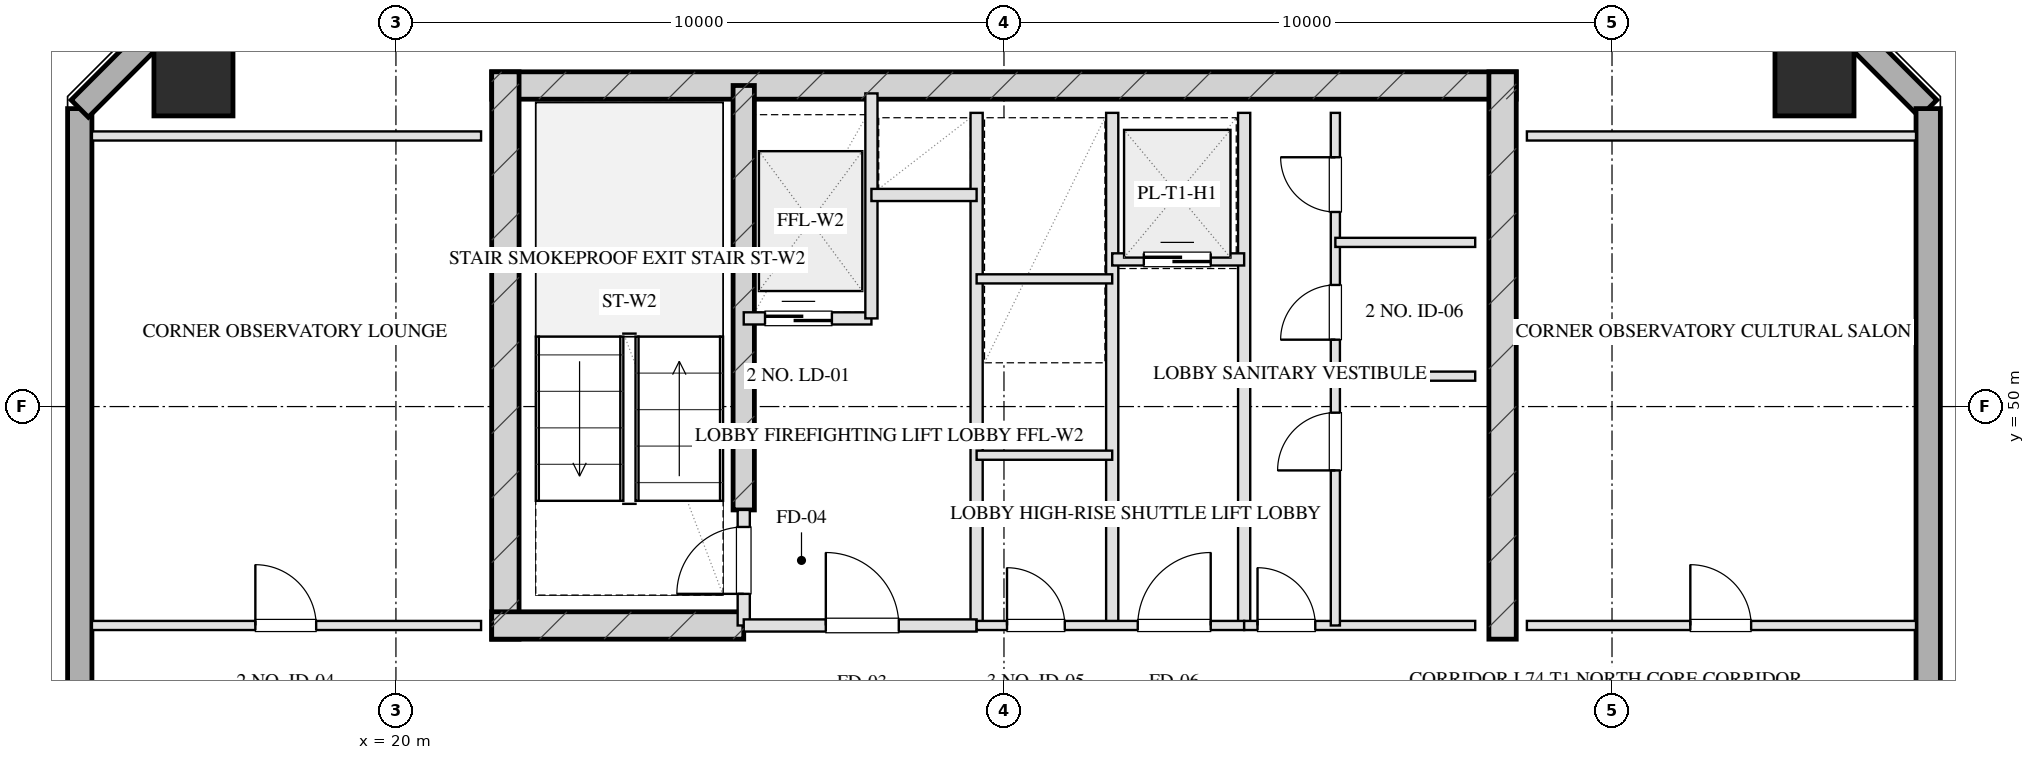
"""IFC4 building model, lengths in metres.
Left out: names, types, materials, properties, quantities, classifications, styles, units other than length and angle.
Written with IfcOpenShell. Run it as: python <this file> out.ifc"""

import sys

from ifc_helpers import new_model, si_unit, direction, frame, frame_2d, origin, origin_2d, place, context, subcontext, project, spatial, rectangle, hollow_rectangle, extrude, element, fill, save


model = new_model("IFC4")
c1 = context("Model", 3, precision=1e-05, world=origin(), true_north=direction((0.0, 1.0)))
c2 = subcontext(c1, "Body", "Model", "MODEL_VIEW")
j1 = project(units=[si_unit("LENGTHUNIT", "METRE"), si_unit("PLANEANGLEUNIT", "RADIAN")], contexts=[c1])
p1 = place(None, origin())
s1 = spatial("IfcSite", under=j1, at=p1, CompositionType="ELEMENT")
p2 = place(p1, origin())
s2 = spatial("IfcBuilding", under=s1, at=p2, CompositionType="ELEMENT")
p3 = place(p2, frame((0.0, 0.0, 269.6)))
s3 = spatial("IfcBuildingStorey", under=s2, at=p3, CompositionType="ELEMENT", Elevation=269.6)
p4 = place(p3, frame((21.575, 55.28, 0.0), z_axis=(0.0, 0.0, 1.0), x_axis=(1.0, 0.0, 0.0)))
e1 = element("IfcWall", 1, at=p4, inside=s3, PredefinedType="SHEAR", context=c2, shape_type="SweptSolid", body=[
    extrude(rectangle(XDim=16.85, YDim=0.45, at=frame_2d((8.425, 0.0))), origin(), (0.0, 0.0, 1.0), 3.2),
])
for number, where, z_axis, x_axis in (
    (2, (21.8, 46.175, 0.0), (0.0, 0.0, 1.0), (0.0, 1.0, 0.0)),
    (3, (38.2, 46.175, 0.0), (0.0, 0.0, 1.0), (0.0, 1.0, 0.0)),
):
    element("IfcWall", number, at=place(p3, frame(where, z_axis=z_axis, x_axis=x_axis)), inside=s3, PredefinedType="SHEAR", context=c2, shape_type="SweptSolid", body=[
        extrude(rectangle(XDim=9.33, YDim=0.45, at=frame_2d((4.665, 0.0))), origin(), (0.0, 0.0, 1.0), 3.2),
    ])
p5 = place(p3, frame((25.72, 48.3, 0.0), z_axis=(0.0, 0.0, 1.0), x_axis=(0.0, 1.0, 0.0)))
e4 = element("IfcWall", 4, at=p5, inside=s3, PredefinedType="SHEAR", context=c2, shape_type="SweptSolid", body=[
    extrude(rectangle(XDim=6.98, YDim=0.35, at=frame_2d((3.49, 0.0))), origin(), (0.0, 0.0, 1.0), 3.2),
])
p6 = place(p3, frame((21.575, 46.4, 0.0), z_axis=(0.0, 0.0, 1.0), x_axis=(1.0, 0.0, 0.0)))
e5 = element("IfcWall", 5, at=p6, inside=s3, PredefinedType="SHEAR", context=c2, shape_type="SweptSolid", body=[
    extrude(rectangle(XDim=4.145, YDim=0.45, at=frame_2d((2.073, 0.0))), origin(), (0.0, 0.0, 1.0), 3.2),
])
for number, where, z_axis, x_axis in (
    (6, (43.33, 55.43, 0.0), (0.0, 0.0, 1.0), (1.0, 0.0, 0.0)),
    (7, (16.67, 55.43, 0.0), (0.0, 0.0, 1.0), (1.0, 0.0, 0.0)),
):
    element("IfcColumn", number, at=place(p3, frame(where, z_axis=z_axis, x_axis=x_axis)), inside=s3, PredefinedType="COLUMN", context=c2, shape_type="SweptSolid", body=[
        extrude(hollow_rectangle(XDim=1.3, YDim=1.3, WallThickness=0.045, at=origin_2d()), origin(), (0.0, 0.0, 1.0), 3.201),
    ])
p7 = place(p3, frame((14.8, 13.1, 0.0), z_axis=(0.0, 0.0, 1.0), x_axis=(0.0, 1.0, 0.0)))
e8 = element("IfcWall", 8, at=p7, inside=s3, PredefinedType="SOLIDWALL", context=c2, shape_type="SweptSolid", body=[
    extrude(rectangle(XDim=41.8, YDim=0.4, at=frame_2d((20.9, 0.0))), origin(), (0.0, 0.0, 1.0), 2.36),
])
p8 = place(p7, frame((22.525, 0.0, 0.75)))
e9 = element("IfcOpeningElement", 9, at=p8, cuts=e8, PredefinedType="OPENING", context=c2, shape_type="SweptSolid", body=[
    extrude(rectangle(XDim=1.95, YDim=1.21, at=frame_2d((0.975, 0.605))), frame((0.0, 0.21, 0.0), z_axis=(0.0, -1.0, 0.0), x_axis=(1.0, 0.0, 0.0)), (0.0, 0.0, 1.0), 0.42),
])
p9 = place(p7, frame((26.325, 0.0, 0.75)))
e10 = element("IfcOpeningElement", 10, at=p9, cuts=e8, PredefinedType="OPENING", context=c2, shape_type="SweptSolid", body=[
    extrude(rectangle(XDim=1.95, YDim=1.21, at=frame_2d((0.975, 0.605))), frame((0.0, 0.21, 0.0), z_axis=(0.0, -1.0, 0.0), x_axis=(1.0, 0.0, 0.0)), (0.0, 0.0, 1.0), 0.42),
])
p10 = place(p7, frame((14.55, 0.0, 0.0)))
e11 = element("IfcOpeningElement", 11, at=p10, cuts=e8, PredefinedType="OPENING", context=c2, shape_type="SweptSolid", body=[
    extrude(rectangle(XDim=1.1, YDim=2.15, at=frame_2d((0.55, 1.075))), frame((0.0, 0.21, 0.0), z_axis=(0.0, -1.0, 0.0), x_axis=(1.0, 0.0, 0.0)), (0.0, 0.0, 1.0), 0.42),
])
for number, where, z_axis, x_axis in (
    (12, (14.8, 54.9, 0.0), (0.0, 0.0, 1.0), (0.707, 0.707, 0.0)),
    (13, (42.8, 57.3, 0.0), (0.0, 0.0, 1.0), (0.707, -0.707, 0.0)),
):
    element("IfcWall", number, at=place(p3, frame(where, z_axis=z_axis, x_axis=x_axis)), inside=s3, PredefinedType="SOLIDWALL", context=c2, shape_type="SweptSolid", body=[
        extrude(rectangle(XDim=3.394, YDim=0.4, at=frame_2d((1.697, 0.0))), origin(), (0.0, 0.0, 1.0), 2.36),
    ])
p11 = place(p3, frame((45.2, 54.9, 0.0), z_axis=(0.0, 0.0, 1.0), x_axis=(0.0, -1.0, 0.0)))
e14 = element("IfcWall", 14, at=p11, inside=s3, PredefinedType="SOLIDWALL", context=c2, shape_type="SweptSolid", body=[
    extrude(rectangle(XDim=41.8, YDim=0.4, at=frame_2d((20.9, 0.0))), origin(), (0.0, 0.0, 1.0), 2.36),
])
p12 = place(p11, frame((17.325, 0.0, 0.75)))
e15 = element("IfcOpeningElement", 15, at=p12, cuts=e14, PredefinedType="OPENING", context=c2, shape_type="SweptSolid", body=[
    extrude(rectangle(XDim=1.95, YDim=1.21, at=frame_2d((0.975, 0.605))), frame((0.0, 0.21, 0.0), z_axis=(0.0, -1.0, 0.0), x_axis=(1.0, 0.0, 0.0)), (0.0, 0.0, 1.0), 0.42),
])
p13 = place(p11, frame((13.525, 0.0, 0.75)))
e16 = element("IfcOpeningElement", 16, at=p13, cuts=e14, PredefinedType="OPENING", context=c2, shape_type="SweptSolid", body=[
    extrude(rectangle(XDim=1.95, YDim=1.21, at=frame_2d((0.975, 0.605))), frame((0.0, 0.21, 0.0), z_axis=(0.0, -1.0, 0.0), x_axis=(1.0, 0.0, 0.0)), (0.0, 0.0, 1.0), 0.42),
])
p14 = place(p11, frame((23.45, 0.0, 0.0)))
e17 = element("IfcOpeningElement", 17, at=p14, cuts=e14, PredefinedType="OPENING", context=c2, shape_type="SweptSolid", body=[
    extrude(rectangle(XDim=1.1, YDim=2.15, at=frame_2d((0.55, 1.075))), frame((0.0, 0.21, 0.0), z_axis=(0.0, -1.0, 0.0), x_axis=(1.0, 0.0, 0.0)), (0.0, 0.0, 1.0), 0.42),
])
p15 = place(p3, frame((25.72, 46.4, 0.0), z_axis=(0.0, 0.0, 1.0), x_axis=(0.0, 1.0, 0.0)))
e18 = element("IfcWall", 18, at=p15, inside=s3, PredefinedType="PARTITIONING", context=c2, shape_type="SweptSolid", body=[
    extrude(rectangle(XDim=1.9, YDim=0.2, at=frame_2d((0.95, 0.0))), origin(), (0.0, 0.0, 1.0), 2.925),
])
p16 = place(p15, frame((0.52, 0.0, 0.0)))
e19 = element("IfcOpeningElement", 19, at=p16, cuts=e18, PredefinedType="OPENING", context=c2, shape_type="SweptSolid", body=[
    extrude(rectangle(XDim=1.1, YDim=2.05, at=frame_2d((0.55, 1.025))), frame((0.0, 0.11, 0.0), z_axis=(0.0, -1.0, 0.0), x_axis=(1.0, 0.0, 0.0)), (0.0, 0.0, 1.0), 0.22),
])
p17 = place(p3, frame((29.55, 46.4, 0.0), z_axis=(0.0, 0.0, 1.0), x_axis=(0.0, 1.0, 0.0)))
e20 = element("IfcWall", 20, at=p17, inside=s3, PredefinedType="PARTITIONING", context=c2, shape_type="SweptSolid", body=[
    extrude(rectangle(XDim=8.43, YDim=0.2, at=frame_2d((4.215, 0.0))), origin(), (0.0, 0.0, 1.0), 2.925),
])
p18 = place(p3, frame((25.72, 46.4, 0.0), z_axis=(0.0, 0.0, 1.0), x_axis=(1.0, 0.0, 0.0)))
e21 = element("IfcWall", 21, at=p18, inside=s3, PredefinedType="PARTITIONING", context=c2, shape_type="SweptSolid", body=[
    extrude(rectangle(XDim=3.83, YDim=0.2, at=frame_2d((1.915, 0.0))), origin(), (0.0, 0.0, 1.0), 2.925),
])
p19 = place(p18, frame((1.35, 0.0, 0.0)))
e22 = element("IfcOpeningElement", 22, at=p19, cuts=e21, PredefinedType="OPENING", context=c2, shape_type="SweptSolid", body=[
    extrude(rectangle(XDim=1.2, YDim=2.05, at=frame_2d((0.6, 1.025))), frame((0.0, 0.11, 0.0), z_axis=(0.0, -1.0, 0.0), x_axis=(1.0, 0.0, 0.0)), (0.0, 0.0, 1.0), 0.22),
])
p20 = place(p3, frame((25.72, 51.45, 0.0), z_axis=(0.0, 0.0, 1.0), x_axis=(1.0, 0.0, 0.0)))
e23 = element("IfcWall", 23, at=p20, inside=s3, PredefinedType="PARTITIONING", context=c2, shape_type="SweptSolid", body=[
    extrude(rectangle(XDim=2.1, YDim=0.2, at=frame_2d((1.05, 0.0))), origin(), (0.0, 0.0, 1.0), 2.925),
])
p21 = place(p20, frame((0.35, 0.0, 0.0)))
e24 = element("IfcOpeningElement", 24, at=p21, cuts=e23, PredefinedType="OPENING", context=c2, shape_type="SweptSolid", body=[
    extrude(rectangle(XDim=1.1, YDim=2.05, at=frame_2d((0.55, 1.025))), frame((0.0, 0.11, 0.0), z_axis=(0.0, -1.0, 0.0), x_axis=(1.0, 0.0, 0.0)), (0.0, 0.0, 1.0), 0.22),
])
p22 = place(p3, frame((27.82, 51.45, 0.0), z_axis=(0.0, 0.0, 1.0), x_axis=(0.0, 1.0, 0.0)))
e25 = element("IfcWall", 25, at=p22, inside=s3, PredefinedType="PARTITIONING", context=c2, shape_type="SweptSolid", body=[
    extrude(rectangle(XDim=3.7, YDim=0.2, at=frame_2d((1.85, 0.0))), origin(), (0.0, 0.0, 1.0), 2.925),
])
p23 = place(p3, frame((27.82, 53.48, 0.0), z_axis=(0.0, 0.0, 1.0), x_axis=(1.0, 0.0, 0.0)))
e26 = element("IfcWall", 26, at=p23, inside=s3, PredefinedType="PARTITIONING", context=c2, shape_type="SweptSolid", body=[
    extrude(rectangle(XDim=1.73, YDim=0.2, at=frame_2d((0.865, 0.0))), origin(), (0.0, 0.0, 1.0), 2.925),
])
for number, where, z_axis, x_axis in (
    (27, (33.95, 46.4, 0.0), (0.0, 0.0, 1.0), (0.0, 1.0, 0.0)),
    (28, (31.78, 46.4, 0.0), (0.0, 0.0, 1.0), (0.0, 1.0, 0.0)),
):
    element("IfcWall", number, at=place(p3, frame(where, z_axis=z_axis, x_axis=x_axis)), inside=s3, PredefinedType="PARTITIONING", context=c2, shape_type="SweptSolid", body=[
        extrude(rectangle(XDim=8.43, YDim=0.2, at=frame_2d((4.215, 0.0))), origin(), (0.0, 0.0, 1.0), 2.925),
    ])
p24 = place(p3, frame((29.55, 46.4, 0.0), z_axis=(0.0, 0.0, 1.0), x_axis=(1.0, 0.0, 0.0)))
e29 = element("IfcWall", 29, at=p24, inside=s3, PredefinedType="PARTITIONING", context=c2, shape_type="SweptSolid", body=[
    extrude(rectangle(XDim=4.4, YDim=0.15, at=frame_2d((2.2, 0.0))), origin(), (0.0, 0.0, 1.0), 2.925),
])
p25 = place(p24, frame((0.5, 0.0, 0.0)))
e30 = element("IfcOpeningElement", 30, at=p25, cuts=e29, PredefinedType="OPENING", context=c2, shape_type="SweptSolid", body=[
    extrude(rectangle(XDim=0.95, YDim=2.05, at=frame_2d((0.475, 1.025))), frame((0.0, 0.085, 0.0), z_axis=(0.0, -1.0, 0.0), x_axis=(1.0, 0.0, 0.0)), (0.0, 0.0, 1.0), 0.17),
])
p26 = place(p24, frame((2.65, 0.0, 0.0)))
e31 = element("IfcOpeningElement", 31, at=p26, cuts=e29, PredefinedType="OPENING", context=c2, shape_type="SweptSolid", body=[
    extrude(rectangle(XDim=1.2, YDim=2.05, at=frame_2d((0.6, 1.025))), frame((0.0, 0.085, 0.0), z_axis=(0.0, -1.0, 0.0), x_axis=(1.0, 0.0, 0.0)), (0.0, 0.0, 1.0), 0.17),
])
for number, where, z_axis, x_axis in (
    (32, (29.55, 49.2, 0.0), (0.0, 0.0, 1.0), (1.0, 0.0, 0.0)),
    (33, (29.55, 52.1, 0.0), (0.0, 0.0, 1.0), (1.0, 0.0, 0.0)),
):
    element("IfcWall", number, at=place(p3, frame(where, z_axis=z_axis, x_axis=x_axis)), inside=s3, PredefinedType="PARTITIONING", context=c2, shape_type="SweptSolid", body=[
        extrude(rectangle(XDim=2.23, YDim=0.15, at=frame_2d((1.115, 0.0))), origin(), (0.0, 0.0, 1.0), 2.925),
    ])
p27 = place(p3, frame((31.78, 52.42, 0.0), z_axis=(0.0, 0.0, 1.0), x_axis=(1.0, 0.0, 0.0)))
e34 = element("IfcWall", 34, at=p27, inside=s3, PredefinedType="PARTITIONING", context=c2, shape_type="SweptSolid", body=[
    extrude(rectangle(XDim=2.17, YDim=0.2, at=frame_2d((1.085, 0.0))), origin(), (0.0, 0.0, 1.0), 2.925),
])
p28 = place(p27, frame((0.52, 0.0, 0.0)))
e35 = element("IfcOpeningElement", 35, at=p28, cuts=e34, PredefinedType="OPENING", context=c2, shape_type="SweptSolid", body=[
    extrude(rectangle(XDim=1.1, YDim=2.05, at=frame_2d((0.55, 1.025))), frame((0.0, 0.11, 0.0), z_axis=(0.0, -1.0, 0.0), x_axis=(1.0, 0.0, 0.0)), (0.0, 0.0, 1.0), 0.22),
])
p29 = place(p3, frame((33.95, 46.4, 0.0), z_axis=(0.0, 0.0, 1.0), x_axis=(1.0, 0.0, 0.0)))
e36 = element("IfcWall", 36, at=p29, inside=s3, PredefinedType="PARTITIONING", context=c2, shape_type="SweptSolid", body=[
    extrude(rectangle(XDim=3.8, YDim=0.15, at=frame_2d((1.9, 0.0))), origin(), (0.0, 0.0, 1.0), 2.925),
])
p30 = place(p29, frame((0.22, 0.0, 0.0)))
e37 = element("IfcOpeningElement", 37, at=p30, cuts=e36, PredefinedType="OPENING", context=c2, shape_type="SweptSolid", body=[
    extrude(rectangle(XDim=0.95, YDim=2.05, at=frame_2d((0.475, 1.025))), frame((0.0, 0.085, 0.0), z_axis=(0.0, -1.0, 0.0), x_axis=(1.0, 0.0, 0.0)), (0.0, 0.0, 1.0), 0.17),
])
p31 = place(p3, frame((35.45, 46.4, 0.0), z_axis=(0.0, 0.0, 1.0), x_axis=(0.0, 1.0, 0.0)))
e38 = element("IfcWall", 38, at=p31, inside=s3, PredefinedType="PARTITIONING", context=c2, shape_type="SweptSolid", body=[
    extrude(rectangle(XDim=8.43, YDim=0.15, at=frame_2d((4.215, 0.0))), origin(), (0.0, 0.0, 1.0), 2.515),
])
p32 = place(p31, frame((2.55, 0.0, 0.0)))
e39 = element("IfcOpeningElement", 39, at=p32, cuts=e38, PredefinedType="OPENING", context=c2, shape_type="SweptSolid", body=[
    extrude(rectangle(XDim=0.95, YDim=2.05, at=frame_2d((0.475, 1.025))), frame((0.0, 0.085, 0.0), z_axis=(0.0, -1.0, 0.0), x_axis=(1.0, 0.0, 0.0)), (0.0, 0.0, 1.0), 0.17),
])
p33 = place(p31, frame((4.7, 0.0, 0.0)))
e40 = element("IfcOpeningElement", 40, at=p33, cuts=e38, PredefinedType="OPENING", context=c2, shape_type="SweptSolid", body=[
    extrude(rectangle(XDim=0.9, YDim=2.05, at=frame_2d((0.45, 1.025))), frame((0.0, 0.085, 0.0), z_axis=(0.0, -1.0, 0.0), x_axis=(1.0, 0.0, 0.0)), (0.0, 0.0, 1.0), 0.17),
])
p34 = place(p31, frame((6.8, 0.0, 0.0)))
e41 = element("IfcOpeningElement", 41, at=p34, cuts=e38, PredefinedType="OPENING", context=c2, shape_type="SweptSolid", body=[
    extrude(rectangle(XDim=0.9, YDim=2.05, at=frame_2d((0.45, 1.025))), frame((0.0, 0.085, 0.0), z_axis=(0.0, -1.0, 0.0), x_axis=(1.0, 0.0, 0.0)), (0.0, 0.0, 1.0), 0.17),
])
for number, where, z_axis, x_axis in (
    (42, (35.45, 50.5, 0.0), (0.0, 0.0, 1.0), (1.0, 0.0, 0.0)),
    (43, (35.45, 52.7, 0.0), (0.0, 0.0, 1.0), (1.0, 0.0, 0.0)),
):
    element("IfcWall", number, at=place(p3, frame(where, z_axis=z_axis, x_axis=x_axis)), inside=s3, PredefinedType="PARTITIONING", context=c2, shape_type="SweptSolid", body=[
        extrude(rectangle(XDim=2.3, YDim=0.15, at=frame_2d((1.15, 0.0))), origin(), (0.0, 0.0, 1.0), 2.925),
    ])
p35 = place(p3, frame((15.0, 54.45, 0.0), z_axis=(0.0, 0.0, 1.0), x_axis=(1.0, 0.0, 0.0)))
e44 = element("IfcWall", 44, at=p35, inside=s3, PredefinedType="PARTITIONING", context=c2, shape_type="SweptSolid", body=[
    extrude(rectangle(XDim=6.4, YDim=0.15, at=frame_2d((3.2, 0.0))), origin(), (0.0, 0.0, 1.0), 2.925),
])
p36 = place(p3, frame((15.0, 46.4, 0.0), z_axis=(0.0, 0.0, 1.0), x_axis=(1.0, 0.0, 0.0)))
e45 = element("IfcWall", 45, at=p36, inside=s3, PredefinedType="PARTITIONING", context=c2, shape_type="SweptSolid", body=[
    extrude(rectangle(XDim=6.4, YDim=0.15, at=frame_2d((3.2, 0.0))), origin(), (0.0, 0.0, 1.0), 2.925),
])
p37 = place(p36, frame((2.688, 0.0, 0.0)))
e46 = element("IfcOpeningElement", 46, at=p37, cuts=e45, PredefinedType="OPENING", context=c2, shape_type="SweptSolid", body=[
    extrude(rectangle(XDim=1.0, YDim=2.05, at=frame_2d((0.5, 1.025))), frame((0.0, 0.085, 0.0), z_axis=(0.0, -1.0, 0.0), x_axis=(1.0, 0.0, 0.0)), (0.0, 0.0, 1.0), 0.17),
])
p38 = place(p3, frame((38.6, 54.45, 0.0), z_axis=(0.0, 0.0, 1.0), x_axis=(1.0, 0.0, 0.0)))
e47 = element("IfcWall", 47, at=p38, inside=s3, PredefinedType="PARTITIONING", context=c2, shape_type="SweptSolid", body=[
    extrude(rectangle(XDim=6.4, YDim=0.15, at=frame_2d((3.2, 0.0))), origin(), (0.0, 0.0, 1.0), 2.925),
])
p39 = place(p3, frame((38.6, 46.4, 0.0), z_axis=(0.0, 0.0, 1.0), x_axis=(1.0, 0.0, 0.0)))
e48 = element("IfcWall", 48, at=p39, inside=s3, PredefinedType="PARTITIONING", context=c2, shape_type="SweptSolid", body=[
    extrude(rectangle(XDim=6.4, YDim=0.15, at=frame_2d((3.2, 0.0))), origin(), (0.0, 0.0, 1.0), 2.925),
])
p40 = place(p39, frame((2.688, 0.0, 0.0)))
e49 = element("IfcOpeningElement", 49, at=p40, cuts=e48, PredefinedType="OPENING", context=c2, shape_type="SweptSolid", body=[
    extrude(rectangle(XDim=1.0, YDim=2.05, at=frame_2d((0.5, 1.025))), frame((0.0, 0.085, 0.0), z_axis=(0.0, -1.0, 0.0), x_axis=(1.0, 0.0, 0.0)), (0.0, 0.0, 1.0), 0.17),
])
p41 = place(p16, origin())
e50 = element("IfcDoor", 50, at=p41, inside=s3, OperationType="SINGLE_SWING_LEFT", PredefinedType="DOOR", context=c2, shape_type="SweptSolid", body=[
    extrude(rectangle(XDim=1.1, YDim=2.05, at=frame_2d((0.55, 1.025))), frame((0.0, 0.025, 0.0), z_axis=(0.0, -1.0, 0.0), x_axis=(1.0, 0.0, 0.0)), (0.0, 0.0, 1.0), 0.05),
])
fill(e19, e50)
p42 = place(p19, origin())
e51 = element("IfcDoor", 51, at=p42, inside=s3, OperationType="SINGLE_SWING_LEFT", PredefinedType="DOOR", context=c2, shape_type="SweptSolid", body=[
    extrude(rectangle(XDim=1.2, YDim=2.05, at=frame_2d((0.6, 1.025))), frame((0.0, 0.025, 0.0), z_axis=(0.0, -1.0, 0.0), x_axis=(1.0, 0.0, 0.0)), (0.0, 0.0, 1.0), 0.05),
])
fill(e22, e51)
p43 = place(p21, origin())
e52 = element("IfcDoor", 52, at=p43, inside=s3, OperationType="DOUBLE_DOOR_SLIDING", PredefinedType="DOOR", context=c2, shape_type="SweptSolid", body=[
    extrude(rectangle(XDim=1.1, YDim=2.05, at=frame_2d((0.55, 1.025))), frame((0.0, 0.025, 0.0), z_axis=(0.0, -1.0, 0.0), x_axis=(1.0, 0.0, 0.0)), (0.0, 0.0, 1.0), 0.05),
])
fill(e24, e52)
p44 = place(p25, origin())
e53 = element("IfcDoor", 53, at=p44, inside=s3, OperationType="SINGLE_SWING_LEFT", PredefinedType="DOOR", context=c2, shape_type="SweptSolid", body=[
    extrude(rectangle(XDim=0.95, YDim=2.05, at=frame_2d((0.475, 1.025))), frame((0.0, 0.025, 0.0), z_axis=(0.0, -1.0, 0.0), x_axis=(1.0, 0.0, 0.0)), (0.0, 0.0, 1.0), 0.05),
])
fill(e30, e53)
p45 = place(p26, origin())
e54 = element("IfcDoor", 54, at=p45, inside=s3, OperationType="SINGLE_SWING_RIGHT", PredefinedType="DOOR", context=c2, shape_type="SweptSolid", body=[
    extrude(rectangle(XDim=1.2, YDim=2.05, at=frame_2d((0.6, 1.025))), frame((0.0, 0.025, 0.0), z_axis=(0.0, -1.0, 0.0), x_axis=(1.0, 0.0, 0.0)), (0.0, 0.0, 1.0), 0.05),
])
fill(e31, e54)
p46 = place(p28, origin())
e55 = element("IfcDoor", 55, at=p46, inside=s3, OperationType="DOUBLE_DOOR_SLIDING", PredefinedType="DOOR", context=c2, shape_type="SweptSolid", body=[
    extrude(rectangle(XDim=1.1, YDim=2.05, at=frame_2d((0.55, 1.025))), frame((0.0, 0.025, 0.0), z_axis=(0.0, -1.0, 0.0), x_axis=(1.0, 0.0, 0.0)), (0.0, 0.0, 1.0), 0.05),
])
fill(e35, e55)
p47 = place(p30, origin())
e56 = element("IfcDoor", 56, at=p47, inside=s3, OperationType="SINGLE_SWING_LEFT", PredefinedType="DOOR", context=c2, shape_type="SweptSolid", body=[
    extrude(rectangle(XDim=0.95, YDim=2.05, at=frame_2d((0.475, 1.025))), frame((0.0, 0.025, 0.0), z_axis=(0.0, -1.0, 0.0), x_axis=(1.0, 0.0, 0.0)), (0.0, 0.0, 1.0), 0.05),
])
fill(e37, e56)
p48 = place(p32, origin())
e57 = element("IfcDoor", 57, at=p48, inside=s3, OperationType="SINGLE_SWING_LEFT", PredefinedType="DOOR", context=c2, shape_type="SweptSolid", body=[
    extrude(rectangle(XDim=0.95, YDim=2.05, at=frame_2d((0.475, 1.025))), frame((0.0, 0.025, 0.0), z_axis=(0.0, -1.0, 0.0), x_axis=(1.0, 0.0, 0.0)), (0.0, 0.0, 1.0), 0.05),
])
fill(e39, e57)
p49 = place(p33, origin())
e58 = element("IfcDoor", 58, at=p49, inside=s3, OperationType="SINGLE_SWING_LEFT", PredefinedType="DOOR", context=c2, shape_type="SweptSolid", body=[
    extrude(rectangle(XDim=0.9, YDim=2.05, at=frame_2d((0.45, 1.025))), frame((0.0, 0.025, 0.0), z_axis=(0.0, -1.0, 0.0), x_axis=(1.0, 0.0, 0.0)), (0.0, 0.0, 1.0), 0.05),
])
fill(e40, e58)
p50 = place(p34, origin())
e59 = element("IfcDoor", 59, at=p50, inside=s3, OperationType="SINGLE_SWING_RIGHT", PredefinedType="DOOR", context=c2, shape_type="SweptSolid", body=[
    extrude(rectangle(XDim=0.9, YDim=2.05, at=frame_2d((0.45, 1.025))), frame((0.0, 0.025, 0.0), z_axis=(0.0, -1.0, 0.0), x_axis=(1.0, 0.0, 0.0)), (0.0, 0.0, 1.0), 0.05),
])
fill(e41, e59)
p51 = place(p37, origin())
e60 = element("IfcDoor", 60, at=p51, inside=s3, OperationType="SINGLE_SWING_LEFT", PredefinedType="DOOR", context=c2, shape_type="SweptSolid", body=[
    extrude(rectangle(XDim=1.0, YDim=2.05, at=frame_2d((0.5, 1.025))), frame((0.0, 0.025, 0.0), z_axis=(0.0, -1.0, 0.0), x_axis=(1.0, 0.0, 0.0)), (0.0, 0.0, 1.0), 0.05),
])
fill(e46, e60)
p52 = place(p40, origin())
e61 = element("IfcDoor", 61, at=p52, inside=s3, OperationType="SINGLE_SWING_LEFT", PredefinedType="DOOR", context=c2, shape_type="SweptSolid", body=[
    extrude(rectangle(XDim=1.0, YDim=2.05, at=frame_2d((0.5, 1.025))), frame((0.0, 0.025, 0.0), z_axis=(0.0, -1.0, 0.0), x_axis=(1.0, 0.0, 0.0)), (0.0, 0.0, 1.0), 0.05),
])
fill(e49, e61)
save(model, sys.argv[1])
